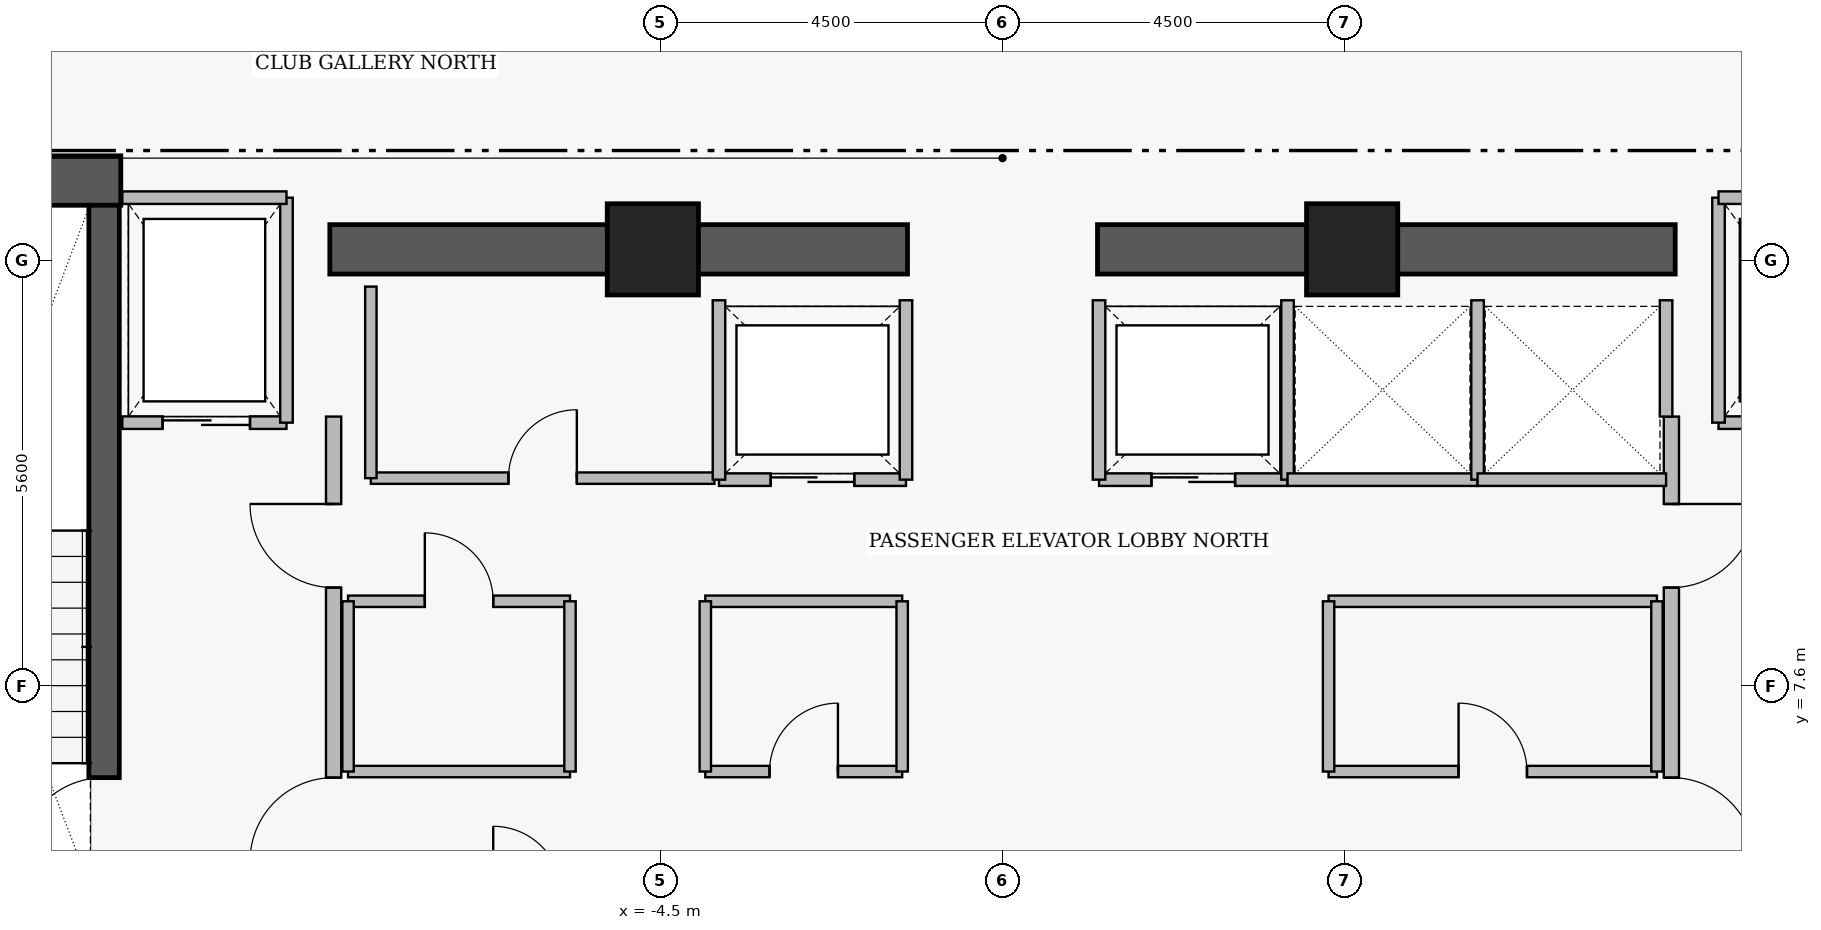
"""IFC4 building model, lengths in metres.
Left out: names, types, materials, properties, quantities, classifications, styles, units other than length and angle.
Written with IfcOpenShell. Run it as: python <this file> out.ifc"""

import sys

from ifc_helpers import new_model, si_unit, direction, frame, frame_2d, origin, origin_2d, place, context, subcontext, project, spatial, rectangle, extrude, element, fill, save


model = new_model("IFC4")
c1 = context("Model", 3, precision=1e-05, world=origin(), true_north=direction((0.0, 1.0)))
c2 = subcontext(c1, "Body", "Model", "MODEL_VIEW")
j1 = project(units=[si_unit("LENGTHUNIT", "METRE"), si_unit("PLANEANGLEUNIT", "RADIAN")], contexts=[c1])
p1 = place(None, origin())
s1 = spatial("IfcSite", under=j1, at=p1, CompositionType="ELEMENT")
p2 = place(p1, origin())
s2 = spatial("IfcBuilding", under=s1, at=p2, CompositionType="ELEMENT")
p3 = place(p2, frame((0.0, 0.0, 211.15)))
s3 = spatial("IfcBuildingStorey", under=s2, at=p3, CompositionType="ELEMENT", Elevation=211.15)
p4 = place(p3, frame((-16.06, 14.255, 0.0), z_axis=(0.0, 0.0, 1.0), x_axis=(1.0, 0.0, 0.0)))
e1 = element("IfcWall", 1, at=p4, inside=s3, PredefinedType="SHEAR", context=c2, shape_type="SweptSolid", body=[
    extrude(rectangle(XDim=4.46, YDim=0.65, at=frame_2d((2.23, 0.0))), origin(), (0.0, 0.0, 1.0), 3.56),
])
for number, where, z_axis, x_axis in (
    (2, (-8.85, 13.35, 0.0), (0.0, 0.0, 1.0), (1.0, 0.0, 0.0)),
    (3, (1.25, 13.35, 0.0), (0.0, 0.0, 1.0), (1.0, 0.0, 0.0)),
):
    element("IfcWall", number, at=place(p3, frame(where, z_axis=z_axis, x_axis=x_axis)), inside=s3, PredefinedType="SHEAR", context=c2, shape_type="SweptSolid", body=[
        extrude(rectangle(XDim=7.6, YDim=0.65, at=frame_2d((3.8, 0.0))), origin(), (0.0, 0.0, 1.0), 3.53),
    ])
p5 = place(p3, frame((-11.82, 4.97, 0.0), z_axis=(0.0, 0.0, 1.0), x_axis=(0.0, 1.0, 0.0)))
e4 = element("IfcWall", 4, at=p5, inside=s3, PredefinedType="SHEAR", context=c2, shape_type="SweptSolid", body=[
    extrude(rectangle(XDim=8.96, YDim=0.4, at=frame_2d((4.48, 0.0))), origin(), (0.0, 0.0, 1.0), 3.56),
])
p6 = place(p5, frame((0.31, 0.0, 0.0)))
e5 = element("IfcOpeningElement", 5, at=p6, cuts=e4, PredefinedType="OPENING", context=c2, shape_type="SweptSolid", body=[
    extrude(rectangle(XDim=1.12, YDim=2.22, at=frame_2d((0.56, 1.11))), frame((0.0, 0.21, 0.0), z_axis=(0.0, -1.0, 0.0), x_axis=(1.0, 0.0, 0.0)), (0.0, 0.0, 1.0), 0.42),
])
for number, where, z_axis, x_axis in (
    (6, (-4.6, 13.35, 0.0), (0.0, 0.0, 1.0), (1.0, 0.0, 0.0)),
    (7, (4.6, 13.35, 0.0), (0.0, 0.0, 1.0), (1.0, 0.0, 0.0)),
):
    element("IfcColumn", number, at=place(p3, frame(where, z_axis=z_axis, x_axis=x_axis)), inside=s3, PredefinedType="COLUMN", context=c2, shape_type="SweptSolid", body=[
        extrude(rectangle(XDim=1.2, YDim=1.2, at=origin_2d()), origin(), (0.0, 0.0, 1.0), 3.75),
    ])
p7 = place(p3, frame((-8.8, 5.05, 0.0), z_axis=(0.0, 0.0, 1.0), x_axis=(0.0, 1.0, 0.0)))
e8 = element("IfcWall", 8, at=p7, inside=s3, PredefinedType="PARTITIONING", context=c2, shape_type="SweptSolid", body=[
    extrude(rectangle(XDim=6.1, YDim=0.2, at=frame_2d((3.05, 0.0))), origin(), (0.0, 0.0, 1.0), 3.53),
])
p8 = place(p7, frame((0.25, 0.0, 0.0)))
e9 = element("IfcOpeningElement", 9, at=p8, cuts=e8, PredefinedType="OPENING", context=c2, shape_type="SweptSolid", body=[
    extrude(rectangle(XDim=1.1, YDim=2.2, at=frame_2d((0.55, 1.1))), frame((0.0, 0.11, 0.0), z_axis=(0.0, -1.0, 0.0), x_axis=(1.0, 0.0, 0.0)), (0.0, 0.0, 1.0), 0.22),
])
p9 = place(p7, frame((3.85, 0.0, 0.0)))
e10 = element("IfcOpeningElement", 10, at=p9, cuts=e8, PredefinedType="OPENING", context=c2, shape_type="SweptSolid", body=[
    extrude(rectangle(XDim=1.1, YDim=2.2, at=frame_2d((0.55, 1.1))), frame((0.0, 0.11, 0.0), z_axis=(0.0, -1.0, 0.0), x_axis=(1.0, 0.0, 0.0)), (0.0, 0.0, 1.0), 0.22),
])
p10 = place(p3, frame((8.8, 11.15, 0.0), z_axis=(0.0, 0.0, 1.0), x_axis=(0.0, -1.0, 0.0)))
e11 = element("IfcWall", 11, at=p10, inside=s3, PredefinedType="PARTITIONING", context=c2, shape_type="SweptSolid", body=[
    extrude(rectangle(XDim=6.1, YDim=0.2, at=frame_2d((3.05, 0.0))), origin(), (0.0, 0.0, 1.0), 3.53),
])
p11 = place(p10, frame((1.15, 0.0, 0.0)))
e12 = element("IfcOpeningElement", 12, at=p11, cuts=e11, PredefinedType="OPENING", context=c2, shape_type="SweptSolid", body=[
    extrude(rectangle(XDim=1.1, YDim=2.2, at=frame_2d((0.55, 1.1))), frame((0.0, 0.11, 0.0), z_axis=(0.0, -1.0, 0.0), x_axis=(1.0, 0.0, 0.0)), (0.0, 0.0, 1.0), 0.22),
])
p12 = place(p10, frame((4.75, 0.0, 0.0)))
e13 = element("IfcOpeningElement", 13, at=p12, cuts=e11, PredefinedType="OPENING", context=c2, shape_type="SweptSolid", body=[
    extrude(rectangle(XDim=1.1, YDim=2.2, at=frame_2d((0.55, 1.1))), frame((0.0, 0.11, 0.0), z_axis=(0.0, -1.0, 0.0), x_axis=(1.0, 0.0, 0.0)), (0.0, 0.0, 1.0), 0.22),
])
p13 = place(p3, frame((-11.58, 11.07, 0.0), z_axis=(0.0, 0.0, 1.0), x_axis=(1.0, 0.0, 0.0)))
e14 = element("IfcWall", 14, at=p13, inside=s3, PredefinedType="PARTITIONING", context=c2, shape_type="SweptSolid", body=[
    extrude(rectangle(XDim=2.16, YDim=0.165, at=frame_2d((1.08, 0.0))), origin(), (0.0, 0.0, 1.0), 3.53),
])
p14 = place(p13, frame((0.53, 0.0, 0.0)))
e15 = element("IfcOpeningElement", 15, at=p14, cuts=e14, PredefinedType="OPENING", context=c2, shape_type="SweptSolid", body=[
    extrude(rectangle(XDim=1.15, YDim=2.25, at=frame_2d((0.575, 1.125))), frame((0.0, 0.093, 0.0), z_axis=(0.0, -1.0, 0.0), x_axis=(1.0, 0.0, 0.0)), (0.0, 0.0, 1.0), 0.185),
])
p15 = place(p3, frame((9.42, 11.07, 0.0), z_axis=(0.0, 0.0, 1.0), x_axis=(1.0, 0.0, 0.0)))
e16 = element("IfcWall", 16, at=p15, inside=s3, PredefinedType="PARTITIONING", context=c2, shape_type="SweptSolid", body=[
    extrude(rectangle(XDim=2.16, YDim=0.165, at=frame_2d((1.08, 0.0))), origin(), (0.0, 0.0, 1.0), 3.53),
])
p16 = place(p15, frame((0.53, 0.0, 0.0)))
e17 = element("IfcOpeningElement", 17, at=p16, cuts=e16, PredefinedType="OPENING", context=c2, shape_type="SweptSolid", body=[
    extrude(rectangle(XDim=1.15, YDim=2.25, at=frame_2d((0.575, 1.125))), frame((0.0, 0.093, 0.0), z_axis=(0.0, -1.0, 0.0), x_axis=(1.0, 0.0, 0.0)), (0.0, 0.0, 1.0), 0.185),
])
p17 = place(p3, frame((-3.73, 10.32, 0.0), z_axis=(0.0, 0.0, 1.0), x_axis=(1.0, 0.0, 0.0)))
e18 = element("IfcWall", 18, at=p17, inside=s3, PredefinedType="PARTITIONING", context=c2, shape_type="SweptSolid", body=[
    extrude(rectangle(XDim=2.46, YDim=0.165, at=frame_2d((1.23, 0.0))), origin(), (0.0, 0.0, 1.0), 3.53),
])
p18 = place(p17, frame((0.68, 0.0, 0.0)))
e19 = element("IfcOpeningElement", 19, at=p18, cuts=e18, PredefinedType="OPENING", context=c2, shape_type="SweptSolid", body=[
    extrude(rectangle(XDim=1.1, YDim=2.25, at=frame_2d((0.55, 1.125))), frame((0.0, 0.093, 0.0), z_axis=(0.0, -1.0, 0.0), x_axis=(1.0, 0.0, 0.0)), (0.0, 0.0, 1.0), 0.185),
])
p19 = place(p3, frame((1.27, 10.32, 0.0), z_axis=(0.0, 0.0, 1.0), x_axis=(1.0, 0.0, 0.0)))
e20 = element("IfcWall", 20, at=p19, inside=s3, PredefinedType="PARTITIONING", context=c2, shape_type="SweptSolid", body=[
    extrude(rectangle(XDim=2.48, YDim=0.165, at=frame_2d((1.24, 0.0))), origin(), (0.0, 0.0, 1.0), 3.53),
])
p20 = place(p19, frame((0.69, 0.0, 0.0)))
e21 = element("IfcOpeningElement", 21, at=p20, cuts=e20, PredefinedType="OPENING", context=c2, shape_type="SweptSolid", body=[
    extrude(rectangle(XDim=1.1, YDim=2.25, at=frame_2d((0.55, 1.125))), frame((0.0, 0.093, 0.0), z_axis=(0.0, -1.0, 0.0), x_axis=(1.0, 0.0, 0.0)), (0.0, 0.0, 1.0), 0.185),
])
p21 = place(p3, frame((-8.31, 10.34, 0.0), z_axis=(0.0, 0.0, 1.0), x_axis=(1.0, 0.0, 0.0)))
e22 = element("IfcWall", 22, at=p21, inside=s3, PredefinedType="PARTITIONING", context=c2, shape_type="SweptSolid", body=[
    extrude(rectangle(XDim=4.52, YDim=0.15, at=frame_2d((2.26, 0.0))), origin(), (0.0, 0.0, 1.0), 3.53),
])
p22 = place(p21, frame((1.81, 0.0, 0.0)))
e23 = element("IfcOpeningElement", 23, at=p22, cuts=e22, PredefinedType="OPENING", context=c2, shape_type="SweptSolid", body=[
    extrude(rectangle(XDim=0.9, YDim=2.15, at=frame_2d((0.45, 1.075))), frame((0.0, 0.085, 0.0), z_axis=(0.0, -1.0, 0.0), x_axis=(1.0, 0.0, 0.0)), (0.0, 0.0, 1.0), 0.17),
])
p23 = place(p3, frame((-8.61, 8.72, 0.0), z_axis=(0.0, 0.0, 1.0), x_axis=(1.0, 0.0, 0.0)))
e24 = element("IfcWall", 24, at=p23, inside=s3, PredefinedType="PARTITIONING", context=c2, shape_type="SweptSolid", body=[
    extrude(rectangle(XDim=2.92, YDim=0.15, at=frame_2d((1.46, 0.0))), origin(), (0.0, 0.0, 1.0), 3.53),
])
p24 = place(p23, frame((1.01, 0.0, 0.0)))
e25 = element("IfcOpeningElement", 25, at=p24, cuts=e24, PredefinedType="OPENING", context=c2, shape_type="SweptSolid", body=[
    extrude(rectangle(XDim=0.9, YDim=2.15, at=frame_2d((0.45, 1.075))), frame((0.0, 0.085, 0.0), z_axis=(0.0, -1.0, 0.0), x_axis=(1.0, 0.0, 0.0)), (0.0, 0.0, 1.0), 0.17),
])
p25 = place(p3, frame((-3.91, 6.48, 0.0), z_axis=(0.0, 0.0, 1.0), x_axis=(1.0, 0.0, 0.0)))
e26 = element("IfcWall", 26, at=p25, inside=s3, PredefinedType="PARTITIONING", context=c2, shape_type="SweptSolid", body=[
    extrude(rectangle(XDim=2.59, YDim=0.15, at=frame_2d((1.295, 0.0))), origin(), (0.0, 0.0, 1.0), 3.53),
])
p26 = place(p25, frame((0.845, 0.0, 0.0)))
e27 = element("IfcOpeningElement", 27, at=p26, cuts=e26, PredefinedType="OPENING", context=c2, shape_type="SweptSolid", body=[
    extrude(rectangle(XDim=0.9, YDim=2.15, at=frame_2d((0.45, 1.075))), frame((0.0, 0.085, 0.0), z_axis=(0.0, -1.0, 0.0), x_axis=(1.0, 0.0, 0.0)), (0.0, 0.0, 1.0), 0.17),
])
p27 = place(p3, frame((4.29, 6.48, 0.0), z_axis=(0.0, 0.0, 1.0), x_axis=(1.0, 0.0, 0.0)))
e28 = element("IfcWall", 28, at=p27, inside=s3, PredefinedType="PARTITIONING", context=c2, shape_type="SweptSolid", body=[
    extrude(rectangle(XDim=4.32, YDim=0.15, at=frame_2d((2.16, 0.0))), origin(), (0.0, 0.0, 1.0), 3.53),
])
p28 = place(p27, frame((1.71, 0.0, 0.0)))
e29 = element("IfcOpeningElement", 29, at=p28, cuts=e28, PredefinedType="OPENING", context=c2, shape_type="SweptSolid", body=[
    extrude(rectangle(XDim=0.9, YDim=2.15, at=frame_2d((0.45, 1.075))), frame((0.0, 0.085, 0.0), z_axis=(0.0, -1.0, 0.0), x_axis=(1.0, 0.0, 0.0)), (0.0, 0.0, 1.0), 0.17),
])
p29 = place(p3, frame((-9.42, 11.07, 0.0), z_axis=(0.0, 0.0, 1.0), x_axis=(0.0, 1.0, 0.0)))
e30 = element("IfcWall", 30, at=p29, inside=s3, PredefinedType="PARTITIONING", context=c2, shape_type="SweptSolid", body=[
    extrude(rectangle(XDim=2.96, YDim=0.165, at=frame_2d((1.48, 0.0))), origin(), (0.0, 0.0, 1.0), 3.53),
])
p30 = place(p3, frame((-11.58, 14.03, 0.0), z_axis=(0.0, 0.0, 1.0), x_axis=(1.0, 0.0, 0.0)))
e31 = element("IfcWall", 31, at=p30, inside=s3, PredefinedType="PARTITIONING", context=c2, shape_type="SweptSolid", body=[
    extrude(rectangle(XDim=2.16, YDim=0.165, at=frame_2d((1.08, 0.0))), origin(), (0.0, 0.0, 1.0), 3.53),
])
p31 = place(p3, frame((9.42, 11.07, 0.0), z_axis=(0.0, 0.0, 1.0), x_axis=(0.0, 1.0, 0.0)))
e32 = element("IfcWall", 32, at=p31, inside=s3, PredefinedType="PARTITIONING", context=c2, shape_type="SweptSolid", body=[
    extrude(rectangle(XDim=2.96, YDim=0.165, at=frame_2d((1.48, 0.0))), origin(), (0.0, 0.0, 1.0), 3.53),
])
p32 = place(p3, frame((9.42, 14.03, 0.0), z_axis=(0.0, 0.0, 1.0), x_axis=(1.0, 0.0, 0.0)))
e33 = element("IfcWall", 33, at=p32, inside=s3, PredefinedType="PARTITIONING", context=c2, shape_type="SweptSolid", body=[
    extrude(rectangle(XDim=2.16, YDim=0.165, at=frame_2d((1.08, 0.0))), origin(), (0.0, 0.0, 1.0), 3.53),
])
for number, where, z_axis, x_axis in (
    (34, (-3.73, 10.32, 0.0), (0.0, 0.0, 1.0), (0.0, 1.0, 0.0)),
    (35, (-1.27, 10.32, 0.0), (0.0, 0.0, 1.0), (0.0, 1.0, 0.0)),
    (36, (1.27, 10.32, 0.0), (0.0, 0.0, 1.0), (0.0, 1.0, 0.0)),
    (37, (3.75, 10.32, 0.0), (0.0, 0.0, 1.0), (0.0, 1.0, 0.0)),
):
    element("IfcWall", number, at=place(p3, frame(where, z_axis=z_axis, x_axis=x_axis)), inside=s3, PredefinedType="PARTITIONING", context=c2, shape_type="SweptSolid", body=[
        extrude(rectangle(XDim=2.36, YDim=0.165, at=frame_2d((1.18, 0.0))), origin(), (0.0, 0.0, 1.0), 3.53),
    ])
p33 = place(p3, frame((3.75, 10.32, 0.0), z_axis=(0.0, 0.0, 1.0), x_axis=(1.0, 0.0, 0.0)))
e38 = element("IfcWall", 38, at=p33, inside=s3, PredefinedType="PARTITIONING", context=c2, shape_type="SweptSolid", body=[
    extrude(rectangle(XDim=2.5, YDim=0.165, at=frame_2d((1.25, 0.0))), origin(), (0.0, 0.0, 1.0), 3.53),
])
p34 = place(p3, frame((6.25, 10.32, 0.0), z_axis=(0.0, 0.0, 1.0), x_axis=(0.0, 1.0, 0.0)))
e39 = element("IfcWall", 39, at=p34, inside=s3, PredefinedType="PARTITIONING", context=c2, shape_type="SweptSolid", body=[
    extrude(rectangle(XDim=2.36, YDim=0.165, at=frame_2d((1.18, 0.0))), origin(), (0.0, 0.0, 1.0), 3.53),
])
p35 = place(p3, frame((6.25, 10.32, 0.0), z_axis=(0.0, 0.0, 1.0), x_axis=(1.0, 0.0, 0.0)))
e40 = element("IfcWall", 40, at=p35, inside=s3, PredefinedType="PARTITIONING", context=c2, shape_type="SweptSolid", body=[
    extrude(rectangle(XDim=2.48, YDim=0.165, at=frame_2d((1.24, 0.0))), origin(), (0.0, 0.0, 1.0), 3.53),
])
p36 = place(p3, frame((8.73, 11.15, 0.0), z_axis=(0.0, 0.0, 1.0), x_axis=(0.0, 1.0, 0.0)))
e41 = element("IfcWall", 41, at=p36, inside=s3, PredefinedType="PARTITIONING", context=c2, shape_type="SweptSolid", body=[
    extrude(rectangle(XDim=1.53, YDim=0.165, at=frame_2d((0.765, 0.0))), origin(), (0.0, 0.0, 1.0), 3.53),
])
p37 = place(p3, frame((-8.31, 10.34, 0.0), z_axis=(0.0, 0.0, 1.0), x_axis=(0.0, 1.0, 0.0)))
e42 = element("IfcWall", 42, at=p37, inside=s3, PredefinedType="PARTITIONING", context=c2, shape_type="SweptSolid", body=[
    extrude(rectangle(XDim=2.52, YDim=0.15, at=frame_2d((1.26, 0.0))), origin(), (0.0, 0.0, 1.0), 3.53),
])
p38 = place(p3, frame((-8.61, 6.48, 0.0), z_axis=(0.0, 0.0, 1.0), x_axis=(1.0, 0.0, 0.0)))
e43 = element("IfcWall", 43, at=p38, inside=s3, PredefinedType="PARTITIONING", context=c2, shape_type="SweptSolid", body=[
    extrude(rectangle(XDim=2.92, YDim=0.15, at=frame_2d((1.46, 0.0))), origin(), (0.0, 0.0, 1.0), 3.53),
])
for number, where, z_axis, x_axis in (
    (44, (-8.61, 6.48, 0.0), (0.0, 0.0, 1.0), (0.0, 1.0, 0.0)),
    (45, (-5.69, 6.48, 0.0), (0.0, 0.0, 1.0), (0.0, 1.0, 0.0)),
):
    element("IfcWall", number, at=place(p3, frame(where, z_axis=z_axis, x_axis=x_axis)), inside=s3, PredefinedType="PARTITIONING", context=c2, shape_type="SweptSolid", body=[
        extrude(rectangle(XDim=2.24, YDim=0.15, at=frame_2d((1.12, 0.0))), origin(), (0.0, 0.0, 1.0), 3.53),
    ])
p39 = place(p3, frame((-3.91, 8.72, 0.0), z_axis=(0.0, 0.0, 1.0), x_axis=(1.0, 0.0, 0.0)))
e46 = element("IfcWall", 46, at=p39, inside=s3, PredefinedType="PARTITIONING", context=c2, shape_type="SweptSolid", body=[
    extrude(rectangle(XDim=2.59, YDim=0.15, at=frame_2d((1.295, 0.0))), origin(), (0.0, 0.0, 1.0), 3.53),
])
for number, where, z_axis, x_axis in (
    (47, (-3.91, 6.48, 0.0), (0.0, 0.0, 1.0), (0.0, 1.0, 0.0)),
    (48, (-1.32, 6.48, 0.0), (0.0, 0.0, 1.0), (0.0, 1.0, 0.0)),
):
    element("IfcWall", number, at=place(p3, frame(where, z_axis=z_axis, x_axis=x_axis)), inside=s3, PredefinedType="PARTITIONING", context=c2, shape_type="SweptSolid", body=[
        extrude(rectangle(XDim=2.24, YDim=0.15, at=frame_2d((1.12, 0.0))), origin(), (0.0, 0.0, 1.0), 3.53),
    ])
p40 = place(p3, frame((4.29, 8.72, 0.0), z_axis=(0.0, 0.0, 1.0), x_axis=(1.0, 0.0, 0.0)))
e49 = element("IfcWall", 49, at=p40, inside=s3, PredefinedType="PARTITIONING", context=c2, shape_type="SweptSolid", body=[
    extrude(rectangle(XDim=4.32, YDim=0.15, at=frame_2d((2.16, 0.0))), origin(), (0.0, 0.0, 1.0), 3.53),
])
for number, where, z_axis, x_axis in (
    (50, (4.29, 6.48, 0.0), (0.0, 0.0, 1.0), (0.0, 1.0, 0.0)),
    (51, (8.61, 6.48, 0.0), (0.0, 0.0, 1.0), (0.0, 1.0, 0.0)),
):
    element("IfcWall", number, at=place(p3, frame(where, z_axis=z_axis, x_axis=x_axis)), inside=s3, PredefinedType="PARTITIONING", context=c2, shape_type="SweptSolid", body=[
        extrude(rectangle(XDim=2.24, YDim=0.15, at=frame_2d((1.12, 0.0))), origin(), (0.0, 0.0, 1.0), 3.53),
    ])
p41 = place(p6, origin())
e52 = element("IfcDoor", 52, at=p41, inside=s3, OperationType="SINGLE_SWING_LEFT", PredefinedType="DOOR", context=c2, shape_type="SweptSolid", body=[
    extrude(rectangle(XDim=1.12, YDim=2.22, at=frame_2d((0.56, 1.11))), frame((0.0, 0.025, 0.0), z_axis=(0.0, -1.0, 0.0), x_axis=(1.0, 0.0, 0.0)), (0.0, 0.0, 1.0), 0.05),
])
fill(e5, e52)
p42 = place(p8, origin())
e53 = element("IfcDoor", 53, at=p42, inside=s3, OperationType="SINGLE_SWING_LEFT", PredefinedType="DOOR", context=c2, shape_type="SweptSolid", body=[
    extrude(rectangle(XDim=1.1, YDim=2.2, at=frame_2d((0.55, 1.1))), frame((0.0, 0.025, 0.0), z_axis=(0.0, -1.0, 0.0), x_axis=(1.0, 0.0, 0.0)), (0.0, 0.0, 1.0), 0.05),
])
fill(e9, e53)
p43 = place(p9, origin())
e54 = element("IfcDoor", 54, at=p43, inside=s3, OperationType="SINGLE_SWING_RIGHT", PredefinedType="DOOR", context=c2, shape_type="SweptSolid", body=[
    extrude(rectangle(XDim=1.1, YDim=2.2, at=frame_2d((0.55, 1.1))), frame((0.0, 0.025, 0.0), z_axis=(0.0, -1.0, 0.0), x_axis=(1.0, 0.0, 0.0)), (0.0, 0.0, 1.0), 0.05),
])
fill(e10, e54)
p44 = place(p11, origin())
e55 = element("IfcDoor", 55, at=p44, inside=s3, OperationType="SINGLE_SWING_LEFT", PredefinedType="DOOR", context=c2, shape_type="SweptSolid", body=[
    extrude(rectangle(XDim=1.1, YDim=2.2, at=frame_2d((0.55, 1.1))), frame((0.0, 0.025, 0.0), z_axis=(0.0, -1.0, 0.0), x_axis=(1.0, 0.0, 0.0)), (0.0, 0.0, 1.0), 0.05),
])
fill(e12, e55)
p45 = place(p12, origin())
e56 = element("IfcDoor", 56, at=p45, inside=s3, OperationType="SINGLE_SWING_RIGHT", PredefinedType="DOOR", context=c2, shape_type="SweptSolid", body=[
    extrude(rectangle(XDim=1.1, YDim=2.2, at=frame_2d((0.55, 1.1))), frame((0.0, 0.025, 0.0), z_axis=(0.0, -1.0, 0.0), x_axis=(1.0, 0.0, 0.0)), (0.0, 0.0, 1.0), 0.05),
])
fill(e13, e56)
p46 = place(p14, origin())
e57 = element("IfcDoor", 57, at=p46, inside=s3, OperationType="SLIDING_TO_LEFT", PredefinedType="DOOR", context=c2, shape_type="SweptSolid", body=[
    extrude(rectangle(XDim=1.15, YDim=2.25, at=frame_2d((0.575, 1.125))), frame((0.0, 0.025, 0.0), z_axis=(0.0, -1.0, 0.0), x_axis=(1.0, 0.0, 0.0)), (0.0, 0.0, 1.0), 0.05),
])
fill(e15, e57)
p47 = place(p18, origin())
e58 = element("IfcDoor", 58, at=p47, inside=s3, OperationType="SLIDING_TO_LEFT", PredefinedType="DOOR", context=c2, shape_type="SweptSolid", body=[
    extrude(rectangle(XDim=1.1, YDim=2.25, at=frame_2d((0.55, 1.125))), frame((0.0, 0.025, 0.0), z_axis=(0.0, -1.0, 0.0), x_axis=(1.0, 0.0, 0.0)), (0.0, 0.0, 1.0), 0.05),
])
fill(e19, e58)
p48 = place(p20, origin())
e59 = element("IfcDoor", 59, at=p48, inside=s3, OperationType="SLIDING_TO_LEFT", PredefinedType="DOOR", context=c2, shape_type="SweptSolid", body=[
    extrude(rectangle(XDim=1.1, YDim=2.25, at=frame_2d((0.55, 1.125))), frame((0.0, 0.025, 0.0), z_axis=(0.0, -1.0, 0.0), x_axis=(1.0, 0.0, 0.0)), (0.0, 0.0, 1.0), 0.05),
])
fill(e21, e59)
p49 = place(p22, origin())
e60 = element("IfcDoor", 60, at=p49, inside=s3, OperationType="SINGLE_SWING_RIGHT", PredefinedType="DOOR", context=c2, shape_type="SweptSolid", body=[
    extrude(rectangle(XDim=0.9, YDim=2.15, at=frame_2d((0.45, 1.075))), frame((0.0, 0.025, 0.0), z_axis=(0.0, -1.0, 0.0), x_axis=(1.0, 0.0, 0.0)), (0.0, 0.0, 1.0), 0.05),
])
fill(e23, e60)
p50 = place(p24, origin())
e61 = element("IfcDoor", 61, at=p50, inside=s3, OperationType="SINGLE_SWING_LEFT", PredefinedType="DOOR", context=c2, shape_type="SweptSolid", body=[
    extrude(rectangle(XDim=0.9, YDim=2.15, at=frame_2d((0.45, 1.075))), frame((0.0, 0.025, 0.0), z_axis=(0.0, -1.0, 0.0), x_axis=(1.0, 0.0, 0.0)), (0.0, 0.0, 1.0), 0.05),
])
fill(e25, e61)
p51 = place(p26, origin())
e62 = element("IfcDoor", 62, at=p51, inside=s3, OperationType="SINGLE_SWING_RIGHT", PredefinedType="DOOR", context=c2, shape_type="SweptSolid", body=[
    extrude(rectangle(XDim=0.9, YDim=2.15, at=frame_2d((0.45, 1.075))), frame((0.0, 0.025, 0.0), z_axis=(0.0, -1.0, 0.0), x_axis=(1.0, 0.0, 0.0)), (0.0, 0.0, 1.0), 0.05),
])
fill(e27, e62)
p52 = place(p28, origin())
e63 = element("IfcDoor", 63, at=p52, inside=s3, OperationType="SINGLE_SWING_LEFT", PredefinedType="DOOR", context=c2, shape_type="SweptSolid", body=[
    extrude(rectangle(XDim=0.9, YDim=2.15, at=frame_2d((0.45, 1.075))), frame((0.0, 0.025, 0.0), z_axis=(0.0, -1.0, 0.0), x_axis=(1.0, 0.0, 0.0)), (0.0, 0.0, 1.0), 0.05),
])
fill(e29, e63)
save(model, sys.argv[1])
